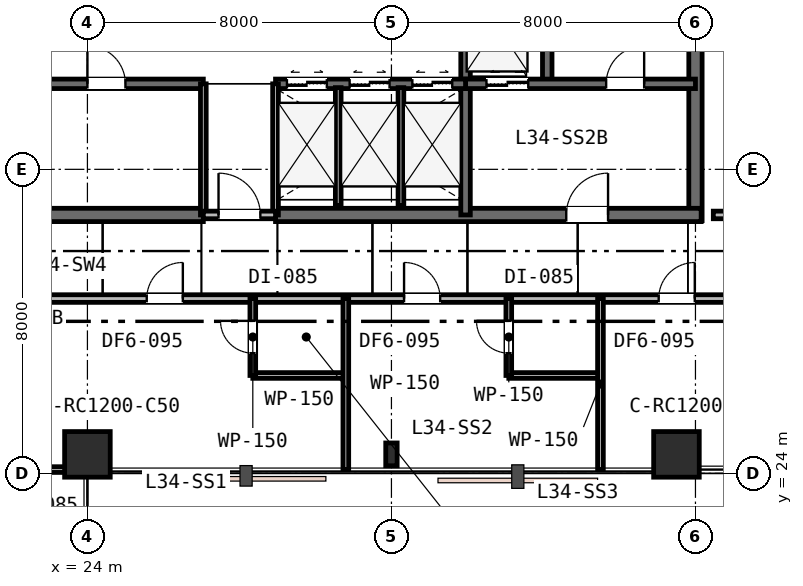
"""IFC4 building model, lengths in metres.
Left out: names, types, materials, properties, quantities, classifications, styles, units other than length and angle.
Written with IfcOpenShell. Run it as: python <this file> out.ifc"""

import sys

from ifc_helpers import new_model, si_unit, direction, frame, frame_2d, origin, origin_2d, place, context, subcontext, project, spatial, rectangle, i_section, extrude, element, fill, save


model = new_model("IFC4")
c1 = context("Model", 3, precision=1e-05, world=origin(), true_north=direction((0.0, 1.0)))
c2 = subcontext(c1, "Body", "Model", "MODEL_VIEW")
j1 = project(units=[si_unit("LENGTHUNIT", "METRE"), si_unit("PLANEANGLEUNIT", "RADIAN")], contexts=[c1])
p1 = place(None, origin())
s1 = spatial("IfcSite", under=j1, at=p1, CompositionType="ELEMENT")
p2 = place(p1, origin())
s2 = spatial("IfcBuilding", under=s1, at=p2, CompositionType="ELEMENT")
p3 = place(p2, frame((0.0, 0.0, 133.2)))
s3 = spatial("IfcBuildingStorey", under=s2, at=p3, CompositionType="ELEMENT", Elevation=133.2)
p4 = place(p3, frame((40.0, 30.65, 0.0), z_axis=(0.0, 0.0, 1.0), x_axis=(0.0, 1.0, 0.0)))
e1 = element("IfcWall", 1, at=p4, inside=s3, PredefinedType="SHEAR", context=c2, shape_type="SweptSolid", body=[
    extrude(rectangle(XDim=12.3, YDim=0.35, at=frame_2d((6.15, 0.0))), origin(), (0.0, 0.0, 1.0), 3.6),
])
p5 = place(p3, frame((15.85, 30.8, 0.0), z_axis=(0.0, 0.0, 1.0), x_axis=(1.0, 0.0, 0.0)))
e2 = element("IfcWall", 2, at=p5, inside=s3, PredefinedType="SHEAR", context=c2, shape_type="SweptSolid", body=[
    extrude(rectangle(XDim=11.2, YDim=0.35, at=frame_2d((5.6, 0.0))), origin(), (0.0, 0.0, 1.0), 3.6),
])
p6 = place(p5, frame((2.45, 0.0, 0.0)))
e3 = element("IfcOpeningElement", 3, at=p6, cuts=e2, PredefinedType="OPENING", context=c2, shape_type="SweptSolid", body=[
    extrude(rectangle(XDim=1.1, YDim=2.15, at=frame_2d((0.55, 1.075))), frame((0.0, 0.185, 0.0), z_axis=(0.0, -1.0, 0.0), x_axis=(1.0, 0.0, 0.0)), (0.0, 0.0, 1.0), 0.37),
])
p7 = place(p3, frame((28.95, 30.8, 0.0), z_axis=(0.0, 0.0, 1.0), x_axis=(1.0, 0.0, 0.0)))
e4 = element("IfcWall", 4, at=p7, inside=s3, PredefinedType="SHEAR", context=c2, shape_type="SweptSolid", body=[
    extrude(rectangle(XDim=11.2, YDim=0.35, at=frame_2d((5.6, 0.0))), origin(), (0.0, 0.0, 1.0), 3.6),
])
p8 = place(p7, frame((7.65, 0.0, 0.0)))
e5 = element("IfcOpeningElement", 5, at=p8, cuts=e4, PredefinedType="OPENING", context=c2, shape_type="SweptSolid", body=[
    extrude(rectangle(XDim=1.1, YDim=2.15, at=frame_2d((0.55, 1.075))), frame((0.0, 0.185, 0.0), z_axis=(0.0, -1.0, 0.0), x_axis=(1.0, 0.0, 0.0)), (0.0, 0.0, 1.0), 0.37),
])
p9 = place(p3, frame((36.1, 34.25, 0.0), z_axis=(0.0, 0.0, 1.0), x_axis=(0.0, 1.0, 0.0)))
e6 = element("IfcWall", 6, at=p9, inside=s3, PredefinedType="SHEAR", context=c2, shape_type="SweptSolid", body=[
    extrude(rectangle(XDim=8.65, YDim=0.25, at=frame_2d((4.325, 0.0))), origin(), (0.0, 0.0, 1.0), 3.6),
])
p10 = place(p3, frame((33.95, 30.8, 0.0), z_axis=(0.0, 0.0, 1.0), x_axis=(0.0, 1.0, 0.0)))
e7 = element("IfcWall", 7, at=p10, inside=s3, PredefinedType="SHEAR", context=c2, shape_type="SweptSolid", body=[
    extrude(rectangle(XDim=6.45, YDim=0.25, at=frame_2d((3.225, 0.0))), origin(), (0.0, 0.0, 1.0), 3.6),
])
p11 = place(p3, frame((33.95, 34.25, 0.0), z_axis=(0.0, 0.0, 1.0), x_axis=(1.0, 0.0, 0.0)))
e8 = element("IfcWall", 8, at=p11, inside=s3, PredefinedType="SHEAR", context=c2, shape_type="SweptSolid", body=[
    extrude(rectangle(XDim=6.05, YDim=0.25, at=frame_2d((3.025, 0.0))), origin(), (0.0, 0.0, 1.0), 3.6),
])
p12 = place(p11, frame((3.7, 0.0, 0.0)))
e9 = element("IfcOpeningElement", 9, at=p12, cuts=e8, PredefinedType="OPENING", context=c2, shape_type="SweptSolid", body=[
    extrude(rectangle(XDim=1.0, YDim=2.15, at=frame_2d((0.5, 1.075))), frame((0.0, 0.135, 0.0), z_axis=(0.0, -1.0, 0.0), x_axis=(1.0, 0.0, 0.0)), (0.0, 0.0, 1.0), 0.27),
])
p13 = place(p11, frame((0.55, 0.0, 0.0)))
e10 = element("IfcOpeningElement", 10, at=p13, cuts=e8, PredefinedType="OPENING", context=c2, shape_type="SweptSolid", body=[
    extrude(rectangle(XDim=1.1, YDim=2.15, at=frame_2d((0.55, 1.075))), frame((0.0, 0.135, 0.0), z_axis=(0.0, -1.0, 0.0), x_axis=(1.0, 0.0, 0.0)), (0.0, 0.0, 1.0), 0.27),
])
p14 = place(p3, frame((22.05, 34.25, 0.0), z_axis=(0.0, 0.0, 1.0), x_axis=(1.0, 0.0, 0.0)))
e11 = element("IfcWall", 11, at=p14, inside=s3, PredefinedType="SHEAR", context=c2, shape_type="SweptSolid", body=[
    extrude(rectangle(XDim=5.0, YDim=0.25, at=frame_2d((2.5, 0.0))), origin(), (0.0, 0.0, 1.0), 3.6),
])
p15 = place(p14, frame((1.95, 0.0, 0.0)))
e12 = element("IfcOpeningElement", 12, at=p15, cuts=e11, PredefinedType="OPENING", context=c2, shape_type="SweptSolid", body=[
    extrude(rectangle(XDim=1.0, YDim=2.15, at=frame_2d((0.5, 1.075))), frame((0.0, 0.135, 0.0), z_axis=(0.0, -1.0, 0.0), x_axis=(1.0, 0.0, 0.0)), (0.0, 0.0, 1.0), 0.27),
])
p16 = place(p3, frame((28.95, 34.25, 0.0), z_axis=(0.0, 0.0, 1.0), x_axis=(1.0, 0.0, 0.0)))
e13 = element("IfcWall", 13, at=p16, inside=s3, PredefinedType="SHEAR", context=c2, shape_type="SweptSolid", body=[
    extrude(rectangle(XDim=5.0, YDim=0.25, at=frame_2d((2.5, 0.0))), origin(), (0.0, 0.0, 1.0), 3.6),
])
p17 = place(p16, frame((0.3, 0.0, 0.0)))
e14 = element("IfcOpeningElement", 14, at=p17, cuts=e13, PredefinedType="OPENING", context=c2, shape_type="SweptSolid", body=[
    extrude(rectangle(XDim=1.05, YDim=2.15, at=frame_2d((0.525, 1.075))), frame((0.0, 0.135, 0.0), z_axis=(0.0, -1.0, 0.0), x_axis=(1.0, 0.0, 0.0)), (0.0, 0.0, 1.0), 0.27),
])
p18 = place(p16, frame((1.95, 0.0, 0.0)))
e15 = element("IfcOpeningElement", 15, at=p18, cuts=e13, PredefinedType="OPENING", context=c2, shape_type="SweptSolid", body=[
    extrude(rectangle(XDim=1.05, YDim=2.15, at=frame_2d((0.525, 1.075))), frame((0.0, 0.135, 0.0), z_axis=(0.0, -1.0, 0.0), x_axis=(1.0, 0.0, 0.0)), (0.0, 0.0, 1.0), 0.27),
])
p19 = place(p16, frame((3.6, 0.0, 0.0)))
e16 = element("IfcOpeningElement", 16, at=p19, cuts=e13, PredefinedType="OPENING", context=c2, shape_type="SweptSolid", body=[
    extrude(rectangle(XDim=1.05, YDim=2.15, at=frame_2d((0.525, 1.075))), frame((0.0, 0.135, 0.0), z_axis=(0.0, -1.0, 0.0), x_axis=(1.0, 0.0, 0.0)), (0.0, 0.0, 1.0), 0.27),
])
p20 = place(p3, frame((24.0, 24.5, 0.0), z_axis=(0.0, 0.0, 1.0), x_axis=(1.0, 0.0, 0.0)))
e17 = element("IfcColumn", 17, at=p20, inside=s3, PredefinedType="COLUMN", context=c2, shape_type="SweptSolid", body=[
    extrude(rectangle(XDim=1.2, YDim=1.2, at=origin_2d()), origin(), (0.0, 0.0, 1.0), 3.6),
])
p21 = place(p3, frame((32.0, 24.5, 0.0), z_axis=(0.0, 0.0, 1.0), x_axis=(1.0, 0.0, 0.0)))
e18 = element("IfcColumn", 18, at=p21, inside=s3, PredefinedType="COLUMN", context=c2, shape_type="SweptSolid", body=[
    extrude(i_section(OverallWidth=0.3, OverallDepth=0.6, WebThickness=0.015, FlangeThickness=0.03, FilletRadius=0.027, at=origin_2d()), origin(), (0.0, 0.0, 1.0), 3.6),
])
p22 = place(p3, frame((39.5, 24.5, 0.0), z_axis=(0.0, 0.0, 1.0), x_axis=(1.0, 0.0, 0.0)))
e19 = element("IfcColumn", 19, at=p22, inside=s3, PredefinedType="COLUMN", context=c2, shape_type="SweptSolid", body=[
    extrude(rectangle(XDim=1.2, YDim=1.2, at=origin_2d()), origin(), (0.0, 0.0, 1.0), 3.6),
])
p23 = place(p3, frame((27.05, 30.8, 0.0), z_axis=(0.0, 0.0, 1.0), x_axis=(0.0, 1.0, 0.0)))
e20 = element("IfcWall", 20, at=p23, inside=s3, PredefinedType="PLUMBINGWALL", context=c2, shape_type="SweptSolid", body=[
    extrude(rectangle(XDim=3.45, YDim=0.15, at=frame_2d((1.725, 0.0))), origin(), (0.0, 0.0, 1.0), 2.96),
])
p24 = place(p3, frame((28.95, 30.8, 0.0), z_axis=(0.0, 0.0, 1.0), x_axis=(0.0, 1.0, 0.0)))
e21 = element("IfcWall", 21, at=p24, inside=s3, PredefinedType="PLUMBINGWALL", context=c2, shape_type="SweptSolid", body=[
    extrude(rectangle(XDim=3.45, YDim=0.15, at=frame_2d((1.725, 0.0))), origin(), (0.0, 0.0, 1.0), 3.33),
])
p25 = place(p3, frame((27.05, 30.8, 0.0), z_axis=(0.0, 0.0, 1.0), x_axis=(1.0, 0.0, 0.0)))
e22 = element("IfcWall", 22, at=p25, inside=s3, PredefinedType="PARTITIONING", context=c2, shape_type="SweptSolid", body=[
    extrude(rectangle(XDim=1.9, YDim=0.2, at=frame_2d((0.95, 0.0))), origin(), (0.0, 0.0, 1.0), 2.96),
])
p26 = place(p25, frame((0.4, 0.0, 0.0)))
e23 = element("IfcOpeningElement", 23, at=p26, cuts=e22, PredefinedType="OPENING", context=c2, shape_type="SweptSolid", body=[
    extrude(rectangle(XDim=1.1, YDim=2.15, at=frame_2d((0.55, 1.075))), frame((0.0, 0.11, 0.0), z_axis=(0.0, -1.0, 0.0), x_axis=(1.0, 0.0, 0.0)), (0.0, 0.0, 1.0), 0.22),
])
for number, where, z_axis, x_axis in (
    (24, (30.6, 31.05, 0.0), (0.0, 0.0, 1.0), (0.0, 1.0, 0.0)),
    (25, (32.25, 31.05, 0.0), (0.0, 0.0, 1.0), (0.0, 1.0, 0.0)),
):
    element("IfcWall", number, at=place(p3, frame(where, z_axis=z_axis, x_axis=x_axis)), inside=s3, PredefinedType="PLUMBINGWALL", context=c2, shape_type="SweptSolid", body=[
        extrude(rectangle(XDim=3.1, YDim=0.15, at=frame_2d((1.55, 0.0))), origin(), (0.0, 0.0, 1.0), 3.33),
    ])
p27 = place(p3, frame((19.0, 28.6, 0.0), z_axis=(0.0, 0.0, 1.0), x_axis=(1.0, 0.0, 0.0)))
e26 = element("IfcWall", 26, at=p27, inside=s3, PredefinedType="PARTITIONING", context=c2, shape_type="SweptSolid", body=[
    extrude(rectangle(XDim=25.2, YDim=0.2, at=frame_2d((12.6, 0.0))), origin(), (0.0, 0.0, 1.0), 2.93),
])
p28 = place(p27, frame((6.561, 0.0, 0.0)))
e27 = element("IfcOpeningElement", 27, at=p28, cuts=e26, PredefinedType="OPENING", context=c2, shape_type="SweptSolid", body=[
    extrude(rectangle(XDim=0.95, YDim=2.15, at=frame_2d((0.475, 1.075))), frame((0.0, 0.11, 0.0), z_axis=(0.0, -1.0, 0.0), x_axis=(1.0, 0.0, 0.0)), (0.0, 0.0, 1.0), 0.22),
])
p29 = place(p27, frame((13.332, 0.0, 0.0)))
e28 = element("IfcOpeningElement", 28, at=p29, cuts=e26, PredefinedType="OPENING", context=c2, shape_type="SweptSolid", body=[
    extrude(rectangle(XDim=0.95, YDim=2.15, at=frame_2d((0.475, 1.075))), frame((0.0, 0.11, 0.0), z_axis=(0.0, -1.0, 0.0), x_axis=(1.0, 0.0, 0.0)), (0.0, 0.0, 1.0), 0.22),
])
p30 = place(p27, frame((20.032, 0.0, 0.0)))
e29 = element("IfcOpeningElement", 29, at=p30, cuts=e26, PredefinedType="OPENING", context=c2, shape_type="SweptSolid", body=[
    extrude(rectangle(XDim=0.95, YDim=2.15, at=frame_2d((0.475, 1.075))), frame((0.0, 0.11, 0.0), z_axis=(0.0, -1.0, 0.0), x_axis=(1.0, 0.0, 0.0)), (0.0, 0.0, 1.0), 0.22),
])
p31 = place(p3, frame((40.47, 30.8, 0.0), z_axis=(0.0, 0.0, 1.0), x_axis=(1.0, 0.0, 0.0)))
e30 = element("IfcWall", 30, at=p31, inside=s3, PredefinedType="PARTITIONING", context=c2, shape_type="SweptSolid", body=[
    extrude(rectangle(XDim=1.73, YDim=0.2, at=frame_2d((0.865, 0.0))), origin(), (0.0, 0.0, 1.0), 2.93),
])
p32 = place(p3, frame((19.0, 24.1, 0.0), z_axis=(0.0, 0.0, 1.0), x_axis=(1.0, 0.0, 0.0)))
e31 = element("IfcWall", 31, at=p32, inside=s3, PredefinedType="PARTITIONING", context=c2, shape_type="SweptSolid", body=[
    extrude(rectangle(XDim=4.9, YDim=0.15, at=frame_2d((2.45, 0.0))), origin(), (0.0, 0.0, 1.0), 2.93),
])
p33 = place(p3, frame((28.352, 26.576, 0.0), z_axis=(0.0, 0.0, 1.0), x_axis=(1.0, 0.0, 0.0)))
e32 = element("IfcWall", 32, at=p33, inside=s3, PredefinedType="PARTITIONING", context=c2, shape_type="SweptSolid", body=[
    extrude(rectangle(XDim=2.448, YDim=0.15, at=frame_2d((1.224, 0.0))), origin(), (0.0, 0.0, 1.0), 3.33),
])
p34 = place(p3, frame((28.352, 26.576, 0.0), z_axis=(0.0, 0.0, 1.0), x_axis=(0.0, 1.0, 0.0)))
e33 = element("IfcWall", 33, at=p34, inside=s3, PredefinedType="PARTITIONING", context=c2, shape_type="SweptSolid", body=[
    extrude(rectangle(XDim=2.024, YDim=0.15, at=frame_2d((1.012, 0.0))), origin(), (0.0, 0.0, 1.0), 3.33),
])
p35 = place(p34, frame((0.587, 0.0, 0.0)))
e34 = element("IfcOpeningElement", 34, at=p35, cuts=e33, PredefinedType="OPENING", context=c2, shape_type="SweptSolid", body=[
    extrude(rectangle(XDim=0.85, YDim=2.15, at=frame_2d((0.425, 1.075))), frame((0.0, 0.085, 0.0), z_axis=(0.0, -1.0, 0.0), x_axis=(1.0, 0.0, 0.0)), (0.0, 0.0, 1.0), 0.17),
])
p36 = place(p3, frame((30.8, 28.6, 0.0), z_axis=(0.0, 0.0, 1.0), x_axis=(0.0, -1.0, 0.0)))
e35 = element("IfcWall", 35, at=p36, inside=s3, PredefinedType="PARTITIONING", context=c2, shape_type="SweptSolid", body=[
    extrude(rectangle(XDim=4.5, YDim=0.15, at=frame_2d((2.25, 0.0))), origin(), (0.0, 0.0, 1.0), 3.01),
])
p37 = place(p3, frame((35.088, 26.576, 0.0), z_axis=(0.0, 0.0, 1.0), x_axis=(1.0, 0.0, 0.0)))
e36 = element("IfcWall", 36, at=p37, inside=s3, PredefinedType="PARTITIONING", context=c2, shape_type="SweptSolid", body=[
    extrude(rectangle(XDim=2.412, YDim=0.15, at=frame_2d((1.206, 0.0))), origin(), (0.0, 0.0, 1.0), 2.96),
])
p38 = place(p3, frame((35.088, 26.576, 0.0), z_axis=(0.0, 0.0, 1.0), x_axis=(0.0, 1.0, 0.0)))
e37 = element("IfcWall", 37, at=p38, inside=s3, PredefinedType="PARTITIONING", context=c2, shape_type="SweptSolid", body=[
    extrude(rectangle(XDim=2.024, YDim=0.15, at=frame_2d((1.012, 0.0))), origin(), (0.0, 0.0, 1.0), 3.33),
])
p39 = place(p38, frame((0.587, 0.0, 0.0)))
e38 = element("IfcOpeningElement", 38, at=p39, cuts=e37, PredefinedType="OPENING", context=c2, shape_type="SweptSolid", body=[
    extrude(rectangle(XDim=0.85, YDim=2.15, at=frame_2d((0.425, 1.075))), frame((0.0, 0.085, 0.0), z_axis=(0.0, -1.0, 0.0), x_axis=(1.0, 0.0, 0.0)), (0.0, 0.0, 1.0), 0.17),
])
p40 = place(p3, frame((37.5, 28.6, 0.0), z_axis=(0.0, 0.0, 1.0), x_axis=(0.0, -1.0, 0.0)))
e39 = element("IfcWall", 39, at=p40, inside=s3, PredefinedType="PARTITIONING", context=c2, shape_type="SweptSolid", body=[
    extrude(rectangle(XDim=4.5, YDim=0.15, at=frame_2d((2.25, 0.0))), origin(), (0.0, 0.0, 1.0), 2.96),
])
p41 = place(p26, origin())
e40 = element("IfcDoor", 40, at=p41, inside=s3, OperationType="SINGLE_SWING_LEFT", PredefinedType="DOOR", context=c2, shape_type="SweptSolid", body=[
    extrude(rectangle(XDim=1.1, YDim=2.15, at=frame_2d((0.55, 1.075))), frame((0.0, 0.025, 0.0), z_axis=(0.0, -1.0, 0.0), x_axis=(1.0, 0.0, 0.0)), (0.0, 0.0, 1.0), 0.05),
])
fill(e23, e40)
p42 = place(p12, origin())
e41 = element("IfcDoor", 41, at=p42, inside=s3, OperationType="SINGLE_SWING_RIGHT", PredefinedType="DOOR", context=c2, shape_type="SweptSolid", body=[
    extrude(rectangle(XDim=1.0, YDim=2.15, at=frame_2d((0.5, 1.075))), frame((0.0, 0.025, 0.0), z_axis=(0.0, -1.0, 0.0), x_axis=(1.0, 0.0, 0.0)), (0.0, 0.0, 1.0), 0.05),
])
fill(e9, e41)
p43 = place(p8, origin())
e42 = element("IfcDoor", 42, at=p43, inside=s3, OperationType="SINGLE_SWING_RIGHT", PredefinedType="DOOR", context=c2, shape_type="SweptSolid", body=[
    extrude(rectangle(XDim=1.1, YDim=2.15, at=frame_2d((0.55, 1.075))), frame((0.0, 0.025, 0.0), z_axis=(0.0, -1.0, 0.0), x_axis=(1.0, 0.0, 0.0)), (0.0, 0.0, 1.0), 0.05),
])
fill(e5, e42)
p44 = place(p15, origin())
e43 = element("IfcDoor", 43, at=p44, inside=s3, OperationType="SINGLE_SWING_LEFT", PredefinedType="DOOR", context=c2, shape_type="SweptSolid", body=[
    extrude(rectangle(XDim=1.0, YDim=2.15, at=frame_2d((0.5, 1.075))), frame((0.0, 0.025, 0.0), z_axis=(0.0, -1.0, 0.0), x_axis=(1.0, 0.0, 0.0)), (0.0, 0.0, 1.0), 0.05),
])
fill(e12, e43)
p45 = place(p28, origin())
e44 = element("IfcDoor", 44, at=p45, inside=s3, OperationType="SINGLE_SWING_RIGHT", PredefinedType="DOOR", context=c2, shape_type="SweptSolid", body=[
    extrude(rectangle(XDim=0.95, YDim=2.15, at=frame_2d((0.475, 1.075))), frame((0.0, 0.025, 0.0), z_axis=(0.0, -1.0, 0.0), x_axis=(1.0, 0.0, 0.0)), (0.0, 0.0, 1.0), 0.05),
])
fill(e27, e44)
p46 = place(p35, origin())
e45 = element("IfcDoor", 45, at=p46, inside=s3, OperationType="SINGLE_SWING_RIGHT", PredefinedType="DOOR", context=c2, shape_type="SweptSolid", body=[
    extrude(rectangle(XDim=0.85, YDim=2.15, at=frame_2d((0.425, 1.075))), frame((0.0, 0.025, 0.0), z_axis=(0.0, -1.0, 0.0), x_axis=(1.0, 0.0, 0.0)), (0.0, 0.0, 1.0), 0.05),
])
fill(e34, e45)
p47 = place(p29, origin())
e46 = element("IfcDoor", 46, at=p47, inside=s3, OperationType="SINGLE_SWING_LEFT", PredefinedType="DOOR", context=c2, shape_type="SweptSolid", body=[
    extrude(rectangle(XDim=0.95, YDim=2.15, at=frame_2d((0.475, 1.075))), frame((0.0, 0.025, 0.0), z_axis=(0.0, -1.0, 0.0), x_axis=(1.0, 0.0, 0.0)), (0.0, 0.0, 1.0), 0.05),
])
fill(e28, e46)
p48 = place(p39, origin())
e47 = element("IfcDoor", 47, at=p48, inside=s3, OperationType="SINGLE_SWING_RIGHT", PredefinedType="DOOR", context=c2, shape_type="SweptSolid", body=[
    extrude(rectangle(XDim=0.85, YDim=2.15, at=frame_2d((0.425, 1.075))), frame((0.0, 0.025, 0.0), z_axis=(0.0, -1.0, 0.0), x_axis=(1.0, 0.0, 0.0)), (0.0, 0.0, 1.0), 0.05),
])
fill(e38, e47)
p49 = place(p30, origin())
e48 = element("IfcDoor", 48, at=p49, inside=s3, OperationType="SINGLE_SWING_RIGHT", PredefinedType="DOOR", context=c2, shape_type="SweptSolid", body=[
    extrude(rectangle(XDim=0.95, YDim=2.15, at=frame_2d((0.475, 1.075))), frame((0.0, 0.025, 0.0), z_axis=(0.0, -1.0, 0.0), x_axis=(1.0, 0.0, 0.0)), (0.0, 0.0, 1.0), 0.05),
])
fill(e29, e48)
p50 = place(p13, origin())
e49 = element("IfcDoor", 49, at=p50, inside=s3, OperationType="DOUBLE_DOOR_SLIDING", PredefinedType="DOOR", context=c2, shape_type="SweptSolid", body=[
    extrude(rectangle(XDim=1.1, YDim=2.15, at=frame_2d((0.55, 1.075))), frame((0.0, 0.025, 0.0), z_axis=(0.0, -1.0, 0.0), x_axis=(1.0, 0.0, 0.0)), (0.0, 0.0, 1.0), 0.05),
])
fill(e10, e49)
p51 = place(p17, origin())
e50 = element("IfcDoor", 50, at=p51, inside=s3, OperationType="DOUBLE_DOOR_SLIDING", PredefinedType="DOOR", context=c2, shape_type="SweptSolid", body=[
    extrude(rectangle(XDim=1.05, YDim=2.15, at=frame_2d((0.525, 1.075))), frame((0.0, 0.025, 0.0), z_axis=(0.0, -1.0, 0.0), x_axis=(1.0, 0.0, 0.0)), (0.0, 0.0, 1.0), 0.05),
])
fill(e14, e50)
p52 = place(p18, origin())
e51 = element("IfcDoor", 51, at=p52, inside=s3, OperationType="DOUBLE_DOOR_SLIDING", PredefinedType="DOOR", context=c2, shape_type="SweptSolid", body=[
    extrude(rectangle(XDim=1.05, YDim=2.15, at=frame_2d((0.525, 1.075))), frame((0.0, 0.025, 0.0), z_axis=(0.0, -1.0, 0.0), x_axis=(1.0, 0.0, 0.0)), (0.0, 0.0, 1.0), 0.05),
])
fill(e15, e51)
p53 = place(p19, origin())
e52 = element("IfcDoor", 52, at=p53, inside=s3, OperationType="DOUBLE_DOOR_SLIDING", PredefinedType="DOOR", context=c2, shape_type="SweptSolid", body=[
    extrude(rectangle(XDim=1.05, YDim=2.15, at=frame_2d((0.525, 1.075))), frame((0.0, 0.025, 0.0), z_axis=(0.0, -1.0, 0.0), x_axis=(1.0, 0.0, 0.0)), (0.0, 0.0, 1.0), 0.05),
])
fill(e16, e52)
save(model, sys.argv[1])
